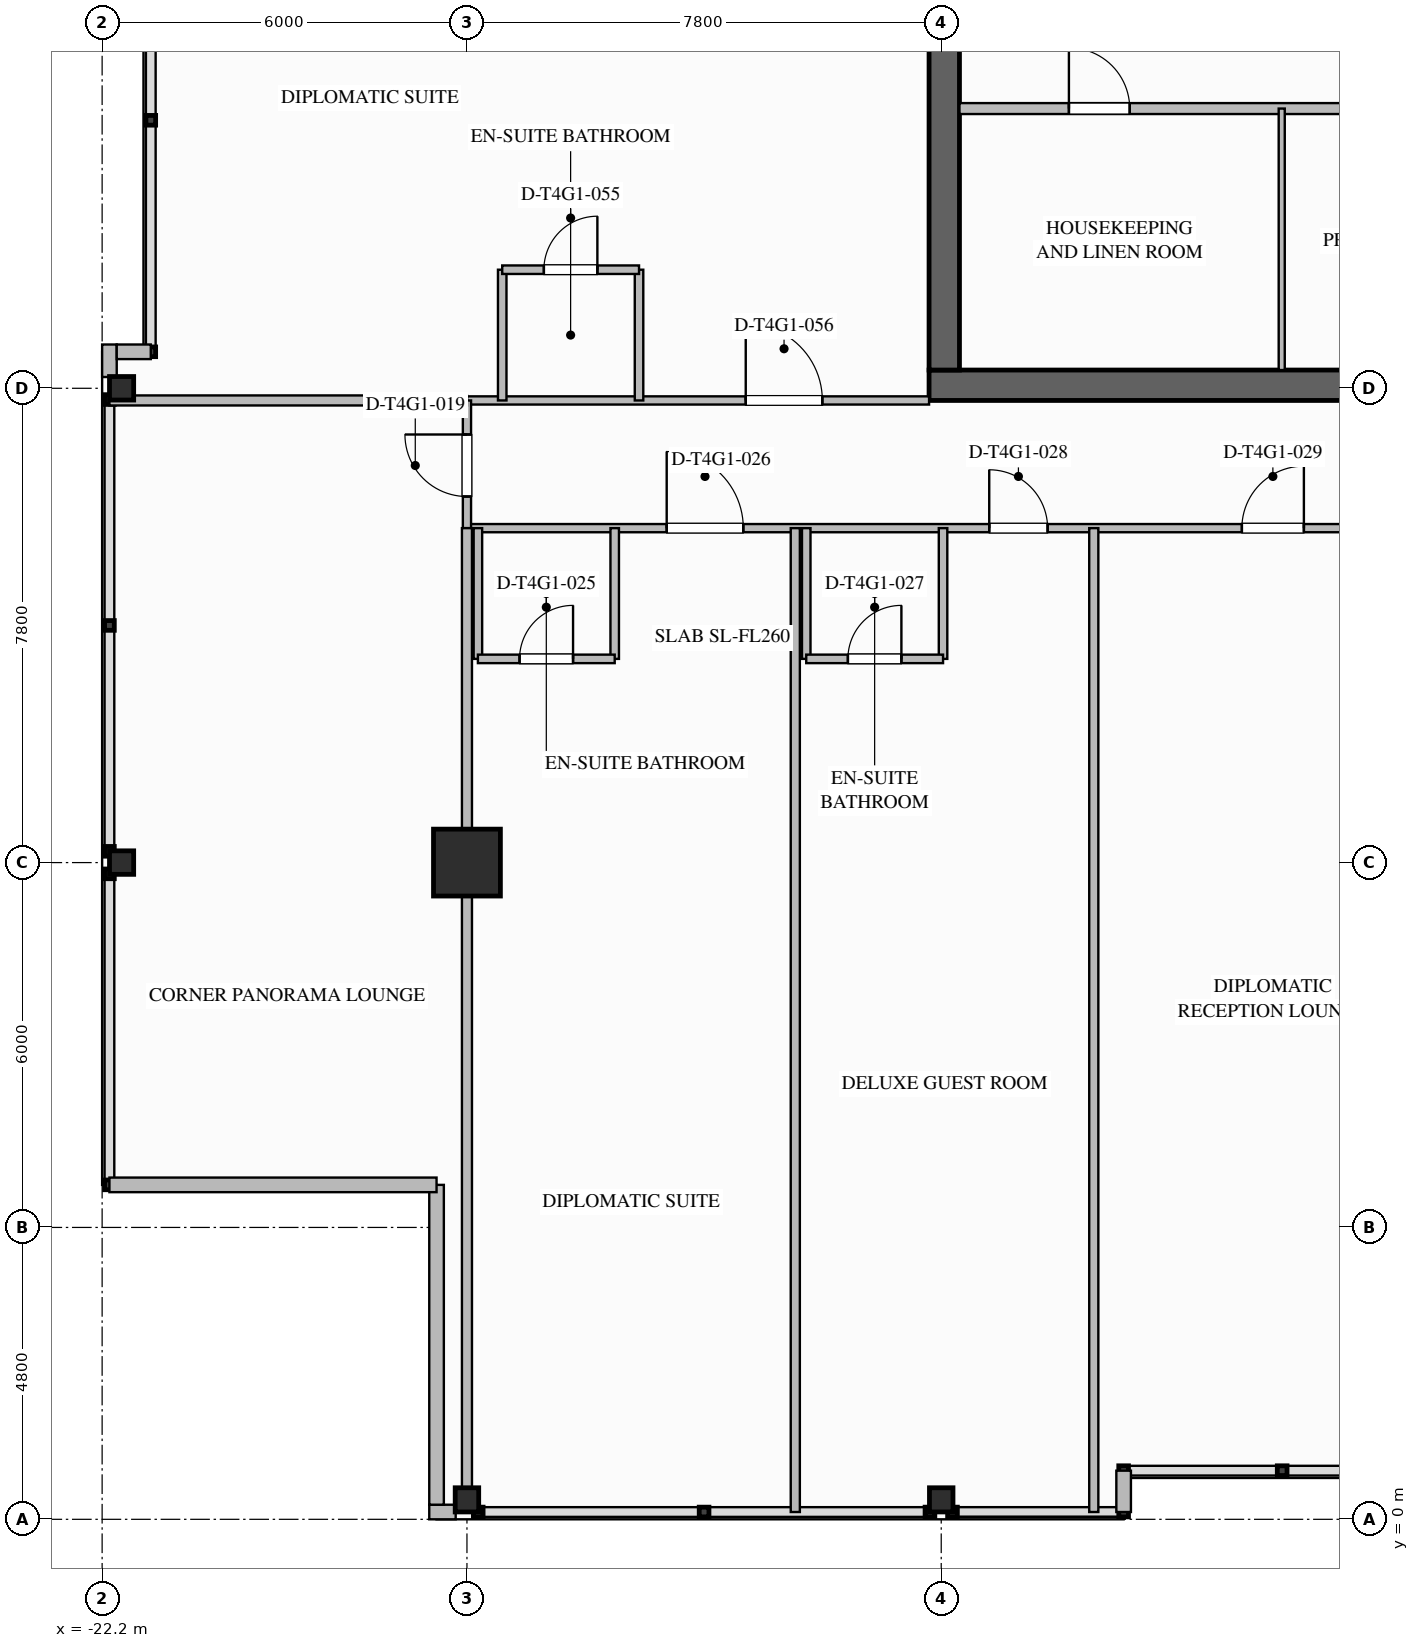
"""IFC4 building model, lengths in metres.
Left out: names, types, materials, properties, quantities, classifications, styles, units other than length and angle.
Written with IfcOpenShell. Run it as: python <this file> out.ifc"""

import sys

from ifc_helpers import new_model, si_unit, direction, frame, frame_2d, origin, origin_2d, place, context, subcontext, project, spatial, rectangle, i_section, extrude, element, fill, save


model = new_model("IFC4")
c1 = context("Model", 3, precision=1e-05, world=origin(), true_north=direction((0.0, 1.0)))
c2 = subcontext(c1, "Body", "Model", "MODEL_VIEW")
j1 = project(units=[si_unit("LENGTHUNIT", "METRE"), si_unit("PLANEANGLEUNIT", "RADIAN")], contexts=[c1])
p1 = place(None, origin())
s1 = spatial("IfcSite", under=j1, at=p1, CompositionType="ELEMENT")
p2 = place(p1, origin())
s2 = spatial("IfcBuilding", under=s1, at=p2, CompositionType="ELEMENT")
p3 = place(p2, frame((0.0, 0.0, 208.7)))
s3 = spatial("IfcBuildingStorey", under=s2, at=p3, CompositionType="ELEMENT", Elevation=208.7)
p4 = place(p3, frame((8.6, 18.65, 0.0), z_axis=(0.0, 0.0, 1.0), x_axis=(-1.0, 0.0, 0.0)))
e1 = element("IfcWall", 1, at=p4, inside=s3, PredefinedType="SHEAR", context=c2, shape_type="SweptSolid", body=[
    extrude(rectangle(XDim=17.2, YDim=0.5, at=frame_2d((8.6, 0.0))), origin(), (0.0, 0.0, 1.0), 3.6),
])
p5 = place(p3, frame((-8.35, 18.9, 0.0), z_axis=(0.0, 0.0, 1.0), x_axis=(0.0, 1.0, 0.0)))
e2 = element("IfcWall", 2, at=p5, inside=s3, PredefinedType="SHEAR", context=c2, shape_type="SweptSolid", body=[
    extrude(rectangle(XDim=16.2, YDim=0.5, at=frame_2d((8.1, 0.0))), origin(), (0.0, 0.0, 1.0), 3.6),
])
p6 = place(p3, frame((-16.2, 10.8, 0.0), z_axis=(0.0, 0.0, 1.0), x_axis=(1.0, 0.0, 0.0)))
e3 = element("IfcColumn", 3, at=p6, inside=s3, PredefinedType="COLUMN", context=c2, shape_type="SweptSolid", body=[
    extrude(rectangle(XDim=1.1, YDim=1.1, at=origin_2d()), origin(), (0.0, 0.0, 1.0), 3.6),
])
for number, where, z_axis, x_axis in (
    (4, (-21.88, 10.8, 0.0), (0.0, 0.0, 1.0), (1.0, 0.0, 0.0)),
    (5, (-21.88, 18.6, 0.0), (0.0, 0.0, 1.0), (1.0, 0.0, 0.0)),
    (6, (-16.2, 0.32, 0.0), (0.0, 0.0, 1.0), (0.0, 1.0, 0.0)),
    (7, (-8.4, 0.32, 0.0), (0.0, 0.0, 1.0), (0.0, 1.0, 0.0)),
):
    element("IfcColumn", number, at=place(p3, frame(where, z_axis=z_axis, x_axis=x_axis)), inside=s3, PredefinedType="COLUMN", context=c2, shape_type="SweptSolid", body=[
        extrude(i_section(OverallWidth=0.397, OverallDepth=0.387, WebThickness=0.021, FlangeThickness=0.033, FilletRadius=0.025, at=origin_2d()), origin(), (0.0, 0.0, 1.0), 3.597),
    ])
p7 = place(p3, frame((-22.08, 18.785, 0.0), z_axis=(0.0, 0.0, 1.0), x_axis=(0.0, 1.0, 0.0)))
e8 = element("IfcWall", 8, at=p7, inside=s3, PredefinedType="STANDARD", context=c2, shape_type="SweptSolid", body=[
    extrude(rectangle(XDim=0.535, YDim=0.24, at=frame_2d((0.267, 0.0))), origin(), (0.0, 0.0, 1.0), 3.34),
])
p8 = place(p3, frame((-16.385, 0.12, 0.0), z_axis=(0.0, 0.0, 1.0), x_axis=(-1.0, 0.0, 0.0)))
e9 = element("IfcWall", 9, at=p8, inside=s3, PredefinedType="STANDARD", context=c2, shape_type="SweptSolid", body=[
    extrude(rectangle(XDim=0.435, YDim=0.24, at=frame_2d((0.217, 0.0))), origin(), (0.0, 0.0, 1.0), 3.34),
])
p9 = place(p3, frame((-16.7, 0.24, 0.0), z_axis=(0.0, 0.0, 1.0), x_axis=(0.0, 1.0, 0.0)))
e10 = element("IfcWall", 10, at=p9, inside=s3, PredefinedType="STANDARD", context=c2, shape_type="SweptSolid", body=[
    extrude(rectangle(XDim=5.26, YDim=0.24, at=frame_2d((2.63, 0.0))), origin(), (0.0, 0.0, 1.0), 3.34),
])
p10 = place(p3, frame((-16.7, 5.5, 0.0), z_axis=(0.0, 0.0, 1.0), x_axis=(-1.0, 0.0, 0.0)))
e11 = element("IfcWall", 11, at=p10, inside=s3, PredefinedType="STANDARD", context=c2, shape_type="SweptSolid", body=[
    extrude(rectangle(XDim=5.38, YDim=0.24, at=frame_2d((2.69, 0.0))), origin(), (0.0, 0.0, 1.0), 3.34),
])
p11 = place(p3, frame((-21.96, 19.2, 0.0), z_axis=(0.0, 0.0, 1.0), x_axis=(1.0, 0.0, 0.0)))
e12 = element("IfcWall", 12, at=p11, inside=s3, PredefinedType="STANDARD", context=c2, shape_type="SweptSolid", body=[
    extrude(rectangle(XDim=0.56, YDim=0.24, at=frame_2d((0.28, 0.0))), origin(), (0.0, 0.0, 1.0), 3.34),
])
p12 = place(p3, frame((-5.4, 0.8, 0.0), z_axis=(0.0, 0.0, 1.0), x_axis=(0.0, -1.0, 0.0)))
e13 = element("IfcWall", 13, at=p12, inside=s3, PredefinedType="STANDARD", context=c2, shape_type="SweptSolid", body=[
    extrude(rectangle(XDim=0.68, YDim=0.24, at=frame_2d((0.34, 0.0))), origin(), (0.0, 0.0, 1.0), 3.34),
])
p13 = place(p3, frame((-8.1, 23.2, 0.0), z_axis=(0.0, 0.0, 1.0), x_axis=(1.0, 0.0, 0.0)))
e14 = element("IfcWall", 14, at=p13, inside=s3, PredefinedType="SOLIDWALL", context=c2, shape_type="SweptSolid", body=[
    extrude(rectangle(XDim=16.2, YDim=0.18, at=frame_2d((8.1, 0.0))), origin(), (0.0, 0.0, 1.0), 3.34),
])
p14 = place(p13, frame((1.8, 0.0, 0.0)))
e15 = element("IfcOpeningElement", 15, at=p14, cuts=e14, PredefinedType="OPENING", context=c2, shape_type="SweptSolid", body=[
    extrude(rectangle(XDim=1.0, YDim=2.1, at=frame_2d((0.5, 1.05))), frame((0.0, 0.1, 0.0), z_axis=(0.0, -1.0, 0.0), x_axis=(1.0, 0.0, 0.0)), (0.0, 0.0, 1.0), 0.2),
])
p15 = place(p13, frame((7.6, 0.0, 0.0)))
e16 = element("IfcOpeningElement", 16, at=p15, cuts=e14, PredefinedType="OPENING", context=c2, shape_type="SweptSolid", body=[
    extrude(rectangle(XDim=1.0, YDim=2.1, at=frame_2d((0.5, 1.05))), frame((0.0, 0.1, 0.0), z_axis=(0.0, -1.0, 0.0), x_axis=(1.0, 0.0, 0.0)), (0.0, 0.0, 1.0), 0.2),
])
p16 = place(p13, frame((13.0, 0.0, 0.0)))
e17 = element("IfcOpeningElement", 17, at=p16, cuts=e14, PredefinedType="OPENING", context=c2, shape_type="SweptSolid", body=[
    extrude(rectangle(XDim=1.0, YDim=2.1, at=frame_2d((0.5, 1.05))), frame((0.0, 0.1, 0.0), z_axis=(0.0, -1.0, 0.0), x_axis=(1.0, 0.0, 0.0)), (0.0, 0.0, 1.0), 0.2),
])
p17 = place(p3, frame((-2.8, 18.9, 0.0), z_axis=(0.0, 0.0, 1.0), x_axis=(0.0, 1.0, 0.0)))
e18 = element("IfcWall", 18, at=p17, inside=s3, PredefinedType="PARTITIONING", context=c2, shape_type="SweptSolid", body=[
    extrude(rectangle(XDim=4.3, YDim=0.1, at=frame_2d((2.15, 0.0))), origin(), (0.0, 0.0, 1.0), 3.34),
])
p18 = place(p3, frame((-16.2, 16.3, 0.0), z_axis=(0.0, 0.0, 1.0), x_axis=(1.0, 0.0, 0.0)))
e19 = element("IfcWall", 19, at=p18, inside=s3, PredefinedType="PARTITIONING", context=c2, shape_type="SweptSolid", body=[
    extrude(rectangle(XDim=38.28, YDim=0.135, at=frame_2d((19.14, 0.0))), origin(), (0.0, 0.0, 1.0), 3.34),
])
p19 = place(p18, frame((35.785, 0.0, 0.0)))
e20 = element("IfcOpeningElement", 20, at=p19, cuts=e19, PredefinedType="OPENING", context=c2, shape_type="SweptSolid", body=[
    extrude(rectangle(XDim=1.26, YDim=2.2, at=frame_2d((0.63, 1.1))), frame((0.0, 0.077, 0.0), z_axis=(0.0, -1.0, 0.0), x_axis=(1.0, 0.0, 0.0)), (0.0, 0.0, 1.0), 0.155),
])
p20 = place(p18, frame((3.285, 0.0, 0.0)))
e21 = element("IfcOpeningElement", 21, at=p20, cuts=e19, PredefinedType="OPENING", context=c2, shape_type="SweptSolid", body=[
    extrude(rectangle(XDim=1.26, YDim=2.2, at=frame_2d((0.63, 1.1))), frame((0.0, 0.077, 0.0), z_axis=(0.0, -1.0, 0.0), x_axis=(1.0, 0.0, 0.0)), (0.0, 0.0, 1.0), 0.155),
])
p21 = place(p18, frame((8.59, 0.0, 0.0)))
e22 = element("IfcOpeningElement", 22, at=p21, cuts=e19, PredefinedType="OPENING", context=c2, shape_type="SweptSolid", body=[
    extrude(rectangle(XDim=0.96, YDim=2.15, at=frame_2d((0.48, 1.075))), frame((0.0, 0.077, 0.0), z_axis=(0.0, -1.0, 0.0), x_axis=(1.0, 0.0, 0.0)), (0.0, 0.0, 1.0), 0.155),
])
p22 = place(p18, frame((12.744, 0.0, 0.0)))
e23 = element("IfcOpeningElement", 23, at=p22, cuts=e19, PredefinedType="OPENING", context=c2, shape_type="SweptSolid", body=[
    extrude(rectangle(XDim=1.02, YDim=2.15, at=frame_2d((0.51, 1.075))), frame((0.0, 0.077, 0.0), z_axis=(0.0, -1.0, 0.0), x_axis=(1.0, 0.0, 0.0)), (0.0, 0.0, 1.0), 0.155),
])
p23 = place(p18, frame((19.73, 0.0, 0.0)))
e24 = element("IfcOpeningElement", 24, at=p23, cuts=e19, PredefinedType="OPENING", context=c2, shape_type="SweptSolid", body=[
    extrude(rectangle(XDim=1.26, YDim=2.2, at=frame_2d((0.63, 1.1))), frame((0.0, 0.077, 0.0), z_axis=(0.0, -1.0, 0.0), x_axis=(1.0, 0.0, 0.0)), (0.0, 0.0, 1.0), 0.155),
])
p24 = place(p18, frame((25.281, 0.0, 0.0)))
e25 = element("IfcOpeningElement", 25, at=p24, cuts=e19, PredefinedType="OPENING", context=c2, shape_type="SweptSolid", body=[
    extrude(rectangle(XDim=0.96, YDim=2.15, at=frame_2d((0.48, 1.075))), frame((0.0, 0.077, 0.0), z_axis=(0.0, -1.0, 0.0), x_axis=(1.0, 0.0, 0.0)), (0.0, 0.0, 1.0), 0.155),
])
p25 = place(p18, frame((30.285, 0.0, 0.0)))
e26 = element("IfcOpeningElement", 26, at=p25, cuts=e19, PredefinedType="OPENING", context=c2, shape_type="SweptSolid", body=[
    extrude(rectangle(XDim=1.26, YDim=2.2, at=frame_2d((0.63, 1.1))), frame((0.0, 0.077, 0.0), z_axis=(0.0, -1.0, 0.0), x_axis=(1.0, 0.0, 0.0)), (0.0, 0.0, 1.0), 0.155),
])
p26 = place(p3, frame((-16.2, 18.4, 0.0), z_axis=(0.0, 0.0, 1.0), x_axis=(1.0, 0.0, 0.0)))
e27 = element("IfcWall", 27, at=p26, inside=s3, PredefinedType="PARTITIONING", context=c2, shape_type="SweptSolid", body=[
    extrude(rectangle(XDim=7.6, YDim=0.135, at=frame_2d((3.8, 0.0))), origin(), (0.0, 0.0, 1.0), 2.718),
])
p27 = place(p26, frame((4.585, 0.0, 0.0)))
e28 = element("IfcOpeningElement", 28, at=p27, cuts=e27, PredefinedType="OPENING", context=c2, shape_type="SweptSolid", body=[
    extrude(rectangle(XDim=1.26, YDim=2.2, at=frame_2d((0.63, 1.1))), frame((0.0, 0.077, 0.0), z_axis=(0.0, -1.0, 0.0), x_axis=(1.0, 0.0, 0.0)), (0.0, 0.0, 1.0), 0.155),
])
p28 = place(p3, frame((-16.2, 16.3, 0.0), z_axis=(0.0, 0.0, 1.0), x_axis=(0.0, 1.0, 0.0)))
e29 = element("IfcWall", 29, at=p28, inside=s3, PredefinedType="PARTITIONING", context=c2, shape_type="SweptSolid", body=[
    extrude(rectangle(XDim=2.1, YDim=0.135, at=frame_2d((1.05, 0.0))), origin(), (0.0, 0.0, 1.0), 2.714),
])
p29 = place(p28, frame((0.52, 0.0, 0.0)))
e30 = element("IfcOpeningElement", 30, at=p29, cuts=e29, PredefinedType="OPENING", context=c2, shape_type="SweptSolid", body=[
    extrude(rectangle(XDim=1.02, YDim=2.15, at=frame_2d((0.51, 1.075))), frame((0.0, 0.077, 0.0), z_axis=(0.0, -1.0, 0.0), x_axis=(1.0, 0.0, 0.0)), (0.0, 0.0, 1.0), 0.155),
])
p30 = place(p3, frame((-16.2, 0.12, 0.0), z_axis=(0.0, 0.0, 1.0), x_axis=(0.0, 1.0, 0.0)))
e31 = element("IfcWall", 31, at=p30, inside=s3, PredefinedType="PARTITIONING", context=c2, shape_type="SweptSolid", body=[
    extrude(rectangle(XDim=16.18, YDim=0.165, at=frame_2d((8.09, 0.0))), origin(), (0.0, 0.0, 1.0), 2.714),
])
p31 = place(p3, frame((-22.08, 18.4, 0.0), z_axis=(0.0, 0.0, 1.0), x_axis=(1.0, 0.0, 0.0)))
e32 = element("IfcWall", 32, at=p31, inside=s3, PredefinedType="PARTITIONING", context=c2, shape_type="SweptSolid", body=[
    extrude(rectangle(XDim=5.88, YDim=0.165, at=frame_2d((2.94, 0.0))), origin(), (0.0, 0.0, 1.0), 2.714),
])
p32 = place(p3, frame((-16.02, 16.3, 0.0), z_axis=(0.0, 0.0, 1.0), x_axis=(0.0, -1.0, 0.0)))
e33 = element("IfcWall", 33, at=p32, inside=s3, PredefinedType="PLUMBINGWALL", context=c2, shape_type="SweptSolid", body=[
    extrude(rectangle(XDim=2.15, YDim=0.14, at=frame_2d((1.075, 0.0))), origin(), (0.0, 0.0, 1.0), 2.714),
])
p33 = place(p3, frame((-13.77, 16.3, 0.0), z_axis=(0.0, 0.0, 1.0), x_axis=(0.0, -1.0, 0.0)))
e34 = element("IfcWall", 34, at=p33, inside=s3, PredefinedType="PLUMBINGWALL", context=c2, shape_type="SweptSolid", body=[
    extrude(rectangle(XDim=2.15, YDim=0.14, at=frame_2d((1.075, 0.0))), origin(), (0.0, 0.0, 1.0), 3.34),
])
p34 = place(p3, frame((-16.02, 14.15, 0.0), z_axis=(0.0, 0.0, 1.0), x_axis=(1.0, 0.0, 0.0)))
e35 = element("IfcWall", 35, at=p34, inside=s3, PredefinedType="PLUMBINGWALL", context=c2, shape_type="SweptSolid", body=[
    extrude(rectangle(XDim=2.25, YDim=0.14, at=frame_2d((1.125, 0.0))), origin(), (0.0, 0.0, 1.0), 3.34),
])
p35 = place(p34, frame((0.685, 0.0, 0.0)))
e36 = element("IfcOpeningElement", 36, at=p35, cuts=e35, PredefinedType="OPENING", context=c2, shape_type="SweptSolid", body=[
    extrude(rectangle(XDim=0.88, YDim=2.1, at=frame_2d((0.44, 1.05))), frame((0.0, 0.08, 0.0), z_axis=(0.0, -1.0, 0.0), x_axis=(1.0, 0.0, 0.0)), (0.0, 0.0, 1.0), 0.16),
])
p36 = place(p3, frame((-10.8, 0.12, 0.0), z_axis=(0.0, 0.0, 1.0), x_axis=(0.0, 1.0, 0.0)))
e37 = element("IfcWall", 37, at=p36, inside=s3, PredefinedType="PARTITIONING", context=c2, shape_type="SweptSolid", body=[
    extrude(rectangle(XDim=16.18, YDim=0.15, at=frame_2d((8.09, 0.0))), origin(), (0.0, 0.0, 1.0), 3.34),
])
p37 = place(p3, frame((-10.62, 16.3, 0.0), z_axis=(0.0, 0.0, 1.0), x_axis=(0.0, -1.0, 0.0)))
e38 = element("IfcWall", 38, at=p37, inside=s3, PredefinedType="PLUMBINGWALL", context=c2, shape_type="SweptSolid", body=[
    extrude(rectangle(XDim=2.15, YDim=0.14, at=frame_2d((1.075, 0.0))), origin(), (0.0, 0.0, 1.0), 3.34),
])
p38 = place(p3, frame((-8.37, 16.3, 0.0), z_axis=(0.0, 0.0, 1.0), x_axis=(0.0, -1.0, 0.0)))
e39 = element("IfcWall", 39, at=p38, inside=s3, PredefinedType="PLUMBINGWALL", context=c2, shape_type="SweptSolid", body=[
    extrude(rectangle(XDim=2.15, YDim=0.14, at=frame_2d((1.075, 0.0))), origin(), (0.0, 0.0, 1.0), 2.718),
])
p39 = place(p3, frame((-10.62, 14.15, 0.0), z_axis=(0.0, 0.0, 1.0), x_axis=(1.0, 0.0, 0.0)))
e40 = element("IfcWall", 40, at=p39, inside=s3, PredefinedType="PLUMBINGWALL", context=c2, shape_type="SweptSolid", body=[
    extrude(rectangle(XDim=2.25, YDim=0.14, at=frame_2d((1.125, 0.0))), origin(), (0.0, 0.0, 1.0), 3.34),
])
p40 = place(p39, frame((0.685, 0.0, 0.0)))
e41 = element("IfcOpeningElement", 41, at=p40, cuts=e40, PredefinedType="OPENING", context=c2, shape_type="SweptSolid", body=[
    extrude(rectangle(XDim=0.88, YDim=2.1, at=frame_2d((0.44, 1.05))), frame((0.0, 0.08, 0.0), z_axis=(0.0, -1.0, 0.0), x_axis=(1.0, 0.0, 0.0)), (0.0, 0.0, 1.0), 0.16),
])
p41 = place(p3, frame((-5.891, 0.12, 0.0), z_axis=(0.0, 0.0, 1.0), x_axis=(0.0, 1.0, 0.0)))
e42 = element("IfcWall", 42, at=p41, inside=s3, PredefinedType="PARTITIONING", context=c2, shape_type="SweptSolid", body=[
    extrude(rectangle(XDim=16.18, YDim=0.15, at=frame_2d((8.09, 0.0))), origin(), (0.0, 0.0, 1.0), 3.34),
])
for number, where, z_axis, x_axis in (
    (43, (-15.62, 18.4, 0.0), (0.0, 0.0, 1.0), (0.0, 1.0, 0.0)),
    (44, (-13.37, 18.4, 0.0), (0.0, 0.0, 1.0), (0.0, 1.0, 0.0)),
):
    element("IfcWall", number, at=place(p3, frame(where, z_axis=z_axis, x_axis=x_axis)), inside=s3, PredefinedType="PLUMBINGWALL", context=c2, shape_type="SweptSolid", body=[
        extrude(rectangle(XDim=2.15, YDim=0.14, at=frame_2d((1.075, 0.0))), origin(), (0.0, 0.0, 1.0), 3.34),
    ])
p42 = place(p3, frame((-15.62, 20.55, 0.0), z_axis=(0.0, 0.0, 1.0), x_axis=(1.0, 0.0, 0.0)))
e45 = element("IfcWall", 45, at=p42, inside=s3, PredefinedType="PLUMBINGWALL", context=c2, shape_type="SweptSolid", body=[
    extrude(rectangle(XDim=2.25, YDim=0.14, at=frame_2d((1.125, 0.0))), origin(), (0.0, 0.0, 1.0), 3.34),
])
p43 = place(p42, frame((0.685, 0.0, 0.0)))
e46 = element("IfcOpeningElement", 46, at=p43, cuts=e45, PredefinedType="OPENING", context=c2, shape_type="SweptSolid", body=[
    extrude(rectangle(XDim=0.88, YDim=2.1, at=frame_2d((0.44, 1.05))), frame((0.0, 0.08, 0.0), z_axis=(0.0, -1.0, 0.0), x_axis=(1.0, 0.0, 0.0)), (0.0, 0.0, 1.0), 0.16),
])
p44 = place(p14, origin())
e47 = element("IfcDoor", 47, at=p44, inside=s3, OperationType="SINGLE_SWING_LEFT", PredefinedType="DOOR", context=c2, shape_type="SweptSolid", body=[
    extrude(rectangle(XDim=1.0, YDim=2.1, at=frame_2d((0.5, 1.05))), frame((0.0, 0.025, 0.0), z_axis=(0.0, -1.0, 0.0), x_axis=(1.0, 0.0, 0.0)), (0.0, 0.0, 1.0), 0.05),
])
fill(e15, e47)
p45 = place(p29, origin())
e48 = element("IfcDoor", 48, at=p45, inside=s3, OperationType="SINGLE_SWING_RIGHT", PredefinedType="DOOR", context=c2, shape_type="SweptSolid", body=[
    extrude(rectangle(XDim=1.02, YDim=2.15, at=frame_2d((0.51, 1.075))), frame((0.0, 0.025, 0.0), z_axis=(0.0, -1.0, 0.0), x_axis=(1.0, 0.0, 0.0)), (0.0, 0.0, 1.0), 0.05),
])
fill(e30, e48)
p46 = place(p35, origin())
e49 = element("IfcDoor", 49, at=p46, inside=s3, OperationType="SINGLE_SWING_RIGHT", PredefinedType="DOOR", context=c2, shape_type="SweptSolid", body=[
    extrude(rectangle(XDim=0.88, YDim=2.1, at=frame_2d((0.44, 1.05))), frame((0.0, 0.025, 0.0), z_axis=(0.0, -1.0, 0.0), x_axis=(1.0, 0.0, 0.0)), (0.0, 0.0, 1.0), 0.05),
])
fill(e36, e49)
p47 = place(p20, origin())
e50 = element("IfcDoor", 50, at=p47, inside=s3, OperationType="SINGLE_SWING_LEFT", PredefinedType="DOOR", context=c2, shape_type="SweptSolid", body=[
    extrude(rectangle(XDim=1.26, YDim=2.2, at=frame_2d((0.63, 1.1))), frame((0.0, 0.025, 0.0), z_axis=(0.0, -1.0, 0.0), x_axis=(1.0, 0.0, 0.0)), (0.0, 0.0, 1.0), 0.05),
])
fill(e21, e50)
p48 = place(p40, origin())
e51 = element("IfcDoor", 51, at=p48, inside=s3, OperationType="SINGLE_SWING_RIGHT", PredefinedType="DOOR", context=c2, shape_type="SweptSolid", body=[
    extrude(rectangle(XDim=0.88, YDim=2.1, at=frame_2d((0.44, 1.05))), frame((0.0, 0.025, 0.0), z_axis=(0.0, -1.0, 0.0), x_axis=(1.0, 0.0, 0.0)), (0.0, 0.0, 1.0), 0.05),
])
fill(e41, e51)
p49 = place(p21, origin())
e52 = element("IfcDoor", 52, at=p49, inside=s3, OperationType="SINGLE_SWING_LEFT", PredefinedType="DOOR", context=c2, shape_type="SweptSolid", body=[
    extrude(rectangle(XDim=0.96, YDim=2.15, at=frame_2d((0.48, 1.075))), frame((0.0, 0.025, 0.0), z_axis=(0.0, -1.0, 0.0), x_axis=(1.0, 0.0, 0.0)), (0.0, 0.0, 1.0), 0.05),
])
fill(e22, e52)
p50 = place(p22, origin())
e53 = element("IfcDoor", 53, at=p50, inside=s3, OperationType="SINGLE_SWING_RIGHT", PredefinedType="DOOR", context=c2, shape_type="SweptSolid", body=[
    extrude(rectangle(XDim=1.02, YDim=2.15, at=frame_2d((0.51, 1.075))), frame((0.0, 0.025, 0.0), z_axis=(0.0, -1.0, 0.0), x_axis=(1.0, 0.0, 0.0)), (0.0, 0.0, 1.0), 0.05),
])
fill(e23, e53)
p51 = place(p43, origin())
e54 = element("IfcDoor", 54, at=p51, inside=s3, OperationType="SINGLE_SWING_RIGHT", PredefinedType="DOOR", context=c2, shape_type="SweptSolid", body=[
    extrude(rectangle(XDim=0.88, YDim=2.1, at=frame_2d((0.44, 1.05))), frame((0.0, 0.025, 0.0), z_axis=(0.0, -1.0, 0.0), x_axis=(1.0, 0.0, 0.0)), (0.0, 0.0, 1.0), 0.05),
])
fill(e46, e54)
p52 = place(p27, origin())
e55 = element("IfcDoor", 55, at=p52, inside=s3, OperationType="SINGLE_SWING_LEFT", PredefinedType="DOOR", context=c2, shape_type="SweptSolid", body=[
    extrude(rectangle(XDim=1.26, YDim=2.2, at=frame_2d((0.63, 1.1))), frame((0.0, 0.025, 0.0), z_axis=(0.0, -1.0, 0.0), x_axis=(1.0, 0.0, 0.0)), (0.0, 0.0, 1.0), 0.05),
])
fill(e28, e55)
save(model, sys.argv[1])
